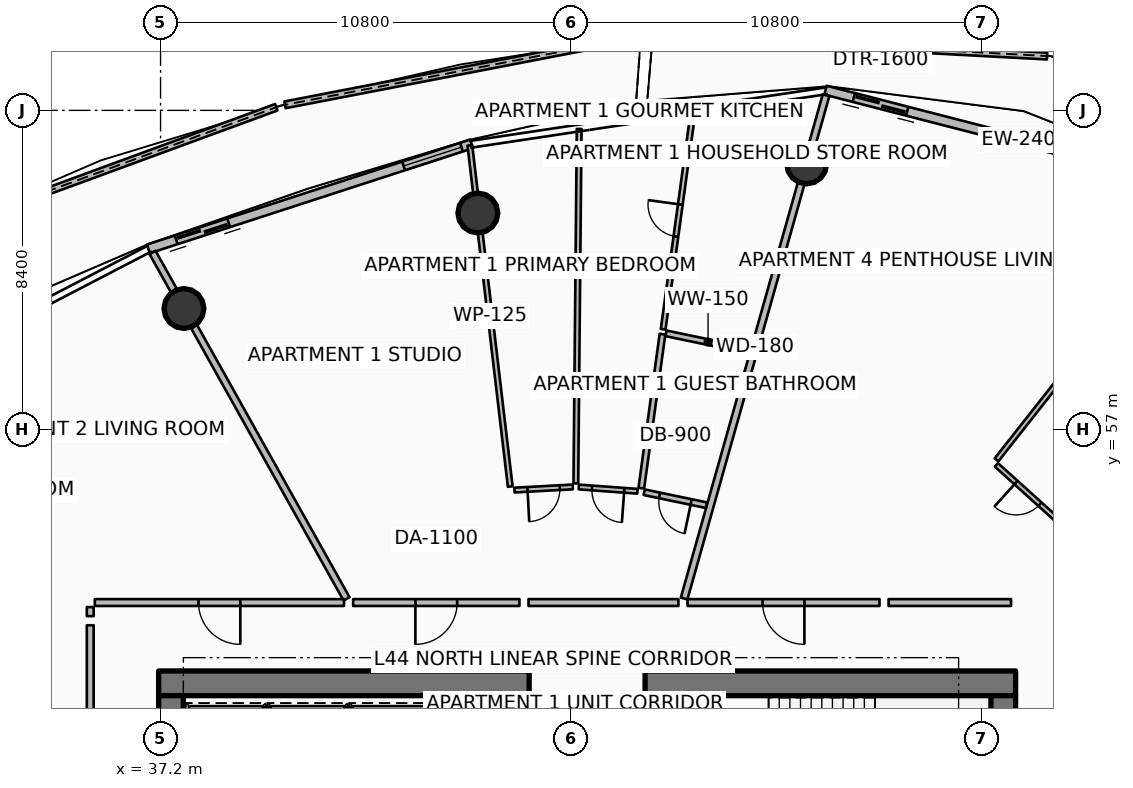
"""IFC4 building model, lengths in metres.
Left out: names, types, materials, properties, quantities, classifications, styles, units other than length and angle.
Written with IfcOpenShell. Run it as: python <this file> out.ifc"""

import sys

from ifc_helpers import new_model, si_unit, direction, frame, frame_2d, origin, origin_2d, place, context, subcontext, project, spatial, polyline, rectangle, circle, outline, extrude, element, fill, save


model = new_model("IFC4")
c1 = context("Model", 3, precision=1e-05, world=origin(), true_north=direction((0.0, 1.0)))
c2 = subcontext(c1, "Body", "Model", "MODEL_VIEW")
j1 = project(units=[si_unit("LENGTHUNIT", "METRE"), si_unit("PLANEANGLEUNIT", "RADIAN")], contexts=[c1])
p1 = place(None, origin())
s1 = spatial("IfcSite", under=j1, at=p1, CompositionType="ELEMENT")
p2 = place(p1, origin())
s2 = spatial("IfcBuilding", under=s1, at=p2, CompositionType="ELEMENT")
p3 = place(p2, frame((0.0, 0.0, 176.55)))
s3 = spatial("IfcBuildingStorey", under=s2, at=p3, CompositionType="ELEMENT", Elevation=176.55)
for number, where, z_axis, x_axis in (
    (1, (37.15, 50.325, 0.0), (0.0, 0.0, 1.0), (1.0, 0.0, 0.0)),
    (2, (49.95, 50.325, 0.0), (0.0, 0.0, 1.0), (1.0, 0.0, 0.0)),
):
    element("IfcWall", number, at=place(p3, frame(where, z_axis=z_axis, x_axis=x_axis)), inside=s3, PredefinedType="SHEAR", context=c2, shape_type="SweptSolid", body=[
        extrude(rectangle(XDim=9.75, YDim=0.65, at=frame_2d((4.875, 0.0))), origin(), (0.0, 0.0, 1.0), 3.75),
    ])
for number, where, z_axis, x_axis in (
    (3, (37.475, 34.0, 0.0), (0.0, 0.0, 1.0), (0.0, 1.0, 0.0)),
    (4, (59.375, 34.0, 0.0), (0.0, 0.0, 1.0), (0.0, 1.0, 0.0)),
):
    element("IfcWall", number, at=place(p3, frame(where, z_axis=z_axis, x_axis=x_axis)), inside=s3, PredefinedType="SHEAR", context=c2, shape_type="SweptSolid", body=[
        extrude(rectangle(XDim=16.0, YDim=0.65, at=frame_2d((8.0, 0.0))), origin(), (0.0, 0.0, 1.0), 3.75),
    ])
p4 = place(p3, frame((51.31, 46.5, 0.0), z_axis=(0.0, 0.0, 1.0), x_axis=(0.0, 1.0, 0.0)))
e5 = element("IfcWall", 5, at=p4, inside=s3, PredefinedType="SHEAR", context=c2, shape_type="SweptSolid", body=[
    extrude(rectangle(XDim=3.5, YDim=0.28, at=frame_2d((1.75, 0.0))), origin(), (0.0, 0.0, 1.0), 3.75),
])
for number, where, z_axis, x_axis in (
    (6, (54.202, 63.992, 0.0), (0.0, 0.0, 1.0), (1.0, 0.0, 0.0)),
    (7, (45.55, 62.7, 0.0), (0.0, 0.0, 1.0), (1.0, 0.0, 0.0)),
    (8, (37.815, 60.186, 0.0), (0.0, 0.0, 1.0), (1.0, 0.0, 0.0)),
):
    element("IfcColumn", number, at=place(p3, frame(where, z_axis=z_axis, x_axis=x_axis)), inside=s3, PredefinedType="COLUMN", context=c2, shape_type="SweptSolid", body=[
        extrude(circle(Radius=0.525, at=origin_2d()), origin(), (0.0, 0.0, 1.0), 3.5),
    ])
p5 = place(p3, frame((60.528, 66.83, 0.0), z_axis=(0.0, 0.0, 1.0), x_axis=(-0.998572477619, 0.053413546421, 0.0)))
e9 = element("IfcWall", 9, at=p5, inside=s3, PredefinedType="PARAPET", context=c2, shape_type="SweptSolid", body=[
    extrude(outline(polyline([(0.0, 0.0), (10.389, 0.0), (10.389, 1.224), (5.195, 1.127), (0.0, 1.148), (0.0, 0.0)])), frame((0.0, 0.09, 0.0), z_axis=(0.0, -1.0, 0.0), x_axis=(1.0, 0.0, 0.0)), (0.0, 0.0, 1.0), 0.18),
])
p6 = place(p3, frame((49.839, 67.351, 0.0), z_axis=(0.0, 0.0, 1.0), x_axis=(-0.981918699124, -0.189303112259, 0.0)))
e10 = element("IfcWall", 10, at=p6, inside=s3, PredefinedType="PARAPET", context=c2, shape_type="SweptSolid", body=[
    extrude(outline(polyline([(0.0, 0.0), (9.537, 0.0), (9.537, 1.632), (4.769, 1.418), (0.0, 1.233), (0.0, 0.0)])), frame((0.0, 0.09, 0.0), z_axis=(0.0, -1.0, 0.0), x_axis=(1.0, 0.0, 0.0)), (0.0, 0.0, 1.0), 0.18),
])
p7 = place(p3, frame((40.244, 65.482, 0.0), z_axis=(0.0, 0.0, 1.0), x_axis=(-0.938669265972, -0.344818806214, 0.0)))
e11 = element("IfcWall", 11, at=p7, inside=s3, PredefinedType="PARAPET", context=c2, shape_type="SweptSolid", body=[
    extrude(outline(polyline([(0.0, 0.0), (9.803, 0.0), (9.802, 1.86), (4.901, 1.798), (0.0, 1.632), (0.0, 0.0)])), frame((0.0, 0.09, 0.0), z_axis=(0.0, -1.0, 0.0), x_axis=(1.0, 0.0, 0.0)), (0.0, 0.0, 1.0), 0.18),
])
p8 = place(p3, frame((64.86, 63.313, 0.0), z_axis=(0.0, 0.0, 1.0), x_axis=(-0.968374028006, 0.249502989727, 0.0)))
e12 = element("IfcWall", 12, at=p8, inside=s3, PredefinedType="SOLIDWALL", context=c2, shape_type="SweptSolid", body=[
    extrude(rectangle(XDim=10.494, YDim=0.24, at=frame_2d((5.247, 0.0))), origin(), (0.0, 0.0, 1.0), 2.45),
])
p9 = place(p8, frame((8.274, 0.0, 0.0)))
e13 = element("IfcOpeningElement", 13, at=p9, cuts=e12, PredefinedType="OPENING", context=c2, shape_type="SweptSolid", body=[
    extrude(rectangle(XDim=1.45, YDim=2.15, at=frame_2d((0.725, 1.075))), frame((0.0, 0.13, 0.0), z_axis=(0.0, -1.0, 0.0), x_axis=(1.0, 0.0, 0.0)), (0.0, 0.0, 1.0), 0.26),
])
p10 = place(p8, frame((0.28, 0.0, 0.65)))
e14 = element("IfcOpeningElement", 14, at=p10, cuts=e12, PredefinedType="OPENING", context=c2, shape_type="SweptSolid", body=[
    extrude(rectangle(XDim=1.6, YDim=1.5, at=frame_2d((0.8, 0.75))), frame((0.0, 0.13, 0.0), z_axis=(0.0, -1.0, 0.0), x_axis=(1.0, 0.0, 0.0)), (0.0, 0.0, 1.0), 0.26),
])
p11 = place(p3, frame((45.384, 64.519, 0.0), z_axis=(0.0, 0.0, 1.0), x_axis=(-0.951058543936, -0.309010753869, 0.0)))
e15 = element("IfcWall", 15, at=p11, inside=s3, PredefinedType="SOLIDWALL", context=c2, shape_type="SweptSolid", body=[
    extrude(rectangle(XDim=8.942, YDim=0.24, at=frame_2d((4.471, 0.0))), origin(), (0.0, 0.0, 1.0), 2.45),
])
p12 = place(p11, frame((6.722, 0.0, 0.0)))
e16 = element("IfcOpeningElement", 16, at=p12, cuts=e15, PredefinedType="OPENING", context=c2, shape_type="SweptSolid", body=[
    extrude(rectangle(XDim=1.45, YDim=2.15, at=frame_2d((0.725, 1.075))), frame((0.0, 0.13, 0.0), z_axis=(0.0, -1.0, 0.0), x_axis=(1.0, 0.0, 0.0)), (0.0, 0.0, 1.0), 0.26),
])
p13 = place(p11, frame((0.28, 0.0, 0.65)))
e17 = element("IfcOpeningElement", 17, at=p13, cuts=e15, PredefinedType="OPENING", context=c2, shape_type="SweptSolid", body=[
    extrude(rectangle(XDim=1.6, YDim=1.5, at=frame_2d((0.8, 0.75))), frame((0.0, 0.13, 0.0), z_axis=(0.0, -1.0, 0.0), x_axis=(1.0, 0.0, 0.0)), (0.0, 0.0, 1.0), 0.26),
])
for number, where, z_axis, x_axis in (
    (18, (39.975, 48.095, 0.0), (0.0, 0.0, 1.0), (0.0, 1.0, 0.0)),
    (19, (42.125, 48.095, 0.0), (0.0, 0.0, 1.0), (0.0, 1.0, 0.0)),
    (20, (44.275, 48.095, 0.0), (0.0, 0.0, 1.0), (0.0, 1.0, 0.0)),
):
    element("IfcWall", number, at=place(p3, frame(where, z_axis=z_axis, x_axis=x_axis)), inside=s3, PredefinedType="PARTITIONING", context=c2, shape_type="SweptSolid", body=[
        extrude(rectangle(XDim=1.61, YDim=0.16, at=frame_2d((0.805, 0.0))), origin(), (0.0, 0.0, 1.0), 3.5),
    ])
p14 = place(p3, frame((46.58, 48.045, 0.0), z_axis=(0.0, 0.0, 1.0), x_axis=(0.0, 1.0, 0.0)))
e21 = element("IfcWall", 21, at=p14, inside=s3, PredefinedType="PARTITIONING", context=c2, shape_type="SweptSolid", body=[
    extrude(rectangle(XDim=1.71, YDim=0.16, at=frame_2d((0.855, 0.0))), origin(), (0.0, 0.0, 1.0), 3.5),
])
p15 = place(p3, frame((50.977, 52.556, 0.0), z_axis=(0.0, 0.0, 1.0), x_axis=(0.271443307373, 0.962454430548, 0.0)))
e22 = element("IfcWall", 22, at=p15, inside=s3, PredefinedType="PARTITIONING", context=c2, shape_type="SweptSolid", body=[
    extrude(rectangle(XDim=13.759, YDim=0.18, at=frame_2d((6.88, 0.0))), origin(), (0.0, 0.0, 1.0), 2.94),
])
p16 = place(p3, frame((42.094, 52.546, 0.0), z_axis=(0.0, 0.0, 1.0), x_axis=(-0.488614041717, 0.872500039104, 0.0)))
e23 = element("IfcWall", 23, at=p16, inside=s3, PredefinedType="PARTITIONING", context=c2, shape_type="SweptSolid", body=[
    extrude(rectangle(XDim=10.448, YDim=0.18, at=frame_2d((5.224, 0.0))), origin(), (0.0, 0.0, 1.0), 2.94),
])
p17 = place(p3, frame((46.643, 52.45, 0.0), z_axis=(0.0, 0.0, 1.0), x_axis=(-1.0, 0.0, 0.0)))
e24 = element("IfcWall", 24, at=p17, inside=s3, PredefinedType="PARTITIONING", context=c2, shape_type="SweptSolid", body=[
    extrude(rectangle(XDim=4.376, YDim=0.18, at=frame_2d((2.188, 0.0))), origin(), (0.0, 0.0, 1.0), 2.94),
])
p18 = place(p17, frame((1.638, 0.0, 0.0)))
e25 = element("IfcOpeningElement", 25, at=p18, cuts=e24, PredefinedType="OPENING", context=c2, shape_type="SweptSolid", body=[
    extrude(rectangle(XDim=1.1, YDim=2.1, at=frame_2d((0.55, 1.05))), frame((0.0, 0.1, 0.0), z_axis=(0.0, -1.0, 0.0), x_axis=(1.0, 0.0, 0.0)), (0.0, 0.0, 1.0), 0.2),
])
p19 = place(p3, frame((50.827, 52.45, 0.0), z_axis=(0.0, 0.0, 1.0), x_axis=(-1.0, 0.0, 0.0)))
e26 = element("IfcWall", 26, at=p19, inside=s3, PredefinedType="PARTITIONING", context=c2, shape_type="SweptSolid", body=[
    extrude(rectangle(XDim=3.944, YDim=0.18, at=frame_2d((1.972, 0.0))), origin(), (0.0, 0.0, 1.0), 2.94),
])
p20 = place(p3, frame((46.402, 55.503, 0.0), z_axis=(0.0, 0.0, 1.0), x_axis=(-0.117526089467, 0.993069795279, 0.0)))
e27 = element("IfcWall", 27, at=p20, inside=s3, PredefinedType="PARTITIONING", context=c2, shape_type="SweptSolid", body=[
    extrude(rectangle(XDim=9.039, YDim=0.125, at=frame_2d((4.519, 0.0))), origin(), (0.0, 0.0, 1.0), 2.94),
])
p21 = place(p3, frame((51.566, 55.011, 0.0), z_axis=(0.0, 0.0, 1.0), x_axis=(-0.978902694913, 0.204326977886, 0.0)))
e28 = element("IfcWall", 28, at=p21, inside=s3, PredefinedType="PARTITIONING", context=c2, shape_type="SweptSolid", body=[
    extrude(rectangle(XDim=1.674, YDim=0.15, at=frame_2d((0.837, 0.0))), origin(), (0.0, 0.0, 1.0), 2.94),
])
p22 = place(p21, frame((0.412, 0.0, 0.0)))
e29 = element("IfcOpeningElement", 29, at=p22, cuts=e28, PredefinedType="OPENING", context=c2, shape_type="SweptSolid", body=[
    extrude(rectangle(XDim=0.85, YDim=2.06, at=frame_2d((0.425, 1.03))), frame((0.0, 0.085, 0.0), z_axis=(0.0, -1.0, 0.0), x_axis=(1.0, 0.0, 0.0)), (0.0, 0.0, 1.0), 0.17),
])
p23 = place(p3, frame((52.711, 59.072, 0.0), z_axis=(0.0, 0.0, 1.0), x_axis=(-0.978902959225, 0.2043257116, 0.0)))
e30 = element("IfcWall", 30, at=p23, inside=s3, PredefinedType="PARTITIONING", context=c2, shape_type="SweptSolid", body=[
    extrude(rectangle(XDim=2.257, YDim=0.15, at=frame_2d((1.128, 0.0))), origin(), (0.0, 0.0, 1.0), 2.94),
])
p24 = place(p3, frame((49.851, 55.46, 0.0), z_axis=(0.0, 0.0, 1.0), x_axis=(0.136221269786, 0.990678437061, 0.0)))
e31 = element("IfcWall", 31, at=p24, inside=s3, PredefinedType="PARTITIONING", context=c2, shape_type="SweptSolid", body=[
    extrude(rectangle(XDim=4.09, YDim=0.15, at=frame_2d((2.045, 0.0))), origin(), (0.0, 0.0, 1.0), 2.94),
])
p25 = place(p3, frame((50.426, 59.641, 0.0), z_axis=(0.0, 0.0, 1.0), x_axis=(0.136229748486, 0.990677271177, 0.0)))
e32 = element("IfcWall", 32, at=p25, inside=s3, PredefinedType="PARTITIONING", context=c2, shape_type="SweptSolid", body=[
    extrude(rectangle(XDim=5.776, YDim=0.125, at=frame_2d((2.888, 0.0))), origin(), (0.0, 0.0, 1.0), 2.94),
])
p26 = place(p25, frame((2.463, 0.0, 0.0)))
e33 = element("IfcOpeningElement", 33, at=p26, cuts=e32, PredefinedType="OPENING", context=c2, shape_type="SweptSolid", body=[
    extrude(rectangle(XDim=0.85, YDim=2.06, at=frame_2d((0.425, 1.03))), frame((0.0, 0.073, 0.0), z_axis=(0.0, -1.0, 0.0), x_axis=(1.0, 0.0, 0.0)), (0.0, 0.0, 1.0), 0.145),
])
p27 = place(p3, frame((48.128, 55.586, 0.0), z_axis=(0.0, 0.0, 1.0), x_axis=(0.009424652092, 0.99995558698, 0.0)))
e34 = element("IfcWall", 34, at=p27, inside=s3, PredefinedType="PARTITIONING", context=c2, shape_type="SweptSolid", body=[
    extrude(rectangle(XDim=9.326, YDim=0.125, at=frame_2d((4.663, 0.0))), origin(), (0.0, 0.0, 1.0), 2.94),
])
p28 = place(p3, frame((49.749, 55.378, 0.0), z_axis=(0.0, 0.0, 1.0), x_axis=(-0.997335405168, 0.072952653133, 0.0)))
e35 = element("IfcWall", 35, at=p28, inside=s3, PredefinedType="PARTITIONING", context=c2, shape_type="SweptSolid", body=[
    extrude(rectangle(XDim=1.546, YDim=0.125, at=frame_2d((0.773, 0.0))), origin(), (0.0, 0.0, 1.0), 2.94),
])
p29 = place(p28, frame((0.348, 0.0, 0.0)))
e36 = element("IfcOpeningElement", 36, at=p29, cuts=e35, PredefinedType="OPENING", context=c2, shape_type="SweptSolid", body=[
    extrude(rectangle(XDim=0.85, YDim=2.06, at=frame_2d((0.425, 1.03))), frame((0.0, 0.073, 0.0), z_axis=(0.0, -1.0, 0.0), x_axis=(1.0, 0.0, 0.0)), (0.0, 0.0, 1.0), 0.145),
])
p30 = place(p3, frame((48.047, 55.492, 0.0), z_axis=(0.0, 0.0, 1.0), x_axis=(-0.998521830203, -0.054352135274, 0.0)))
e37 = element("IfcWall", 37, at=p30, inside=s3, PredefinedType="PARTITIONING", context=c2, shape_type="SweptSolid", body=[
    extrude(rectangle(XDim=1.536, YDim=0.125, at=frame_2d((0.768, 0.0))), origin(), (0.0, 0.0, 1.0), 2.94),
])
p31 = place(p30, frame((0.343, 0.0, 0.0)))
e38 = element("IfcOpeningElement", 38, at=p31, cuts=e37, PredefinedType="OPENING", context=c2, shape_type="SweptSolid", body=[
    extrude(rectangle(XDim=0.85, YDim=2.06, at=frame_2d((0.425, 1.03))), frame((0.0, 0.073, 0.0), z_axis=(0.0, -1.0, 0.0), x_axis=(1.0, 0.0, 0.0)), (0.0, 0.0, 1.0), 0.145),
])
p32 = place(p3, frame((42.028, 52.45, 0.0), z_axis=(0.0, 0.0, 1.0), x_axis=(-1.0, 0.0, 0.0)))
e39 = element("IfcWall", 39, at=p32, inside=s3, PredefinedType="PARTITIONING", context=c2, shape_type="SweptSolid", body=[
    extrude(rectangle(XDim=6.558, YDim=0.18, at=frame_2d((3.279, 0.0))), origin(), (0.0, 0.0, 1.0), 2.94),
])
p33 = place(p32, frame((2.729, 0.0, 0.0)))
e40 = element("IfcOpeningElement", 40, at=p33, cuts=e39, PredefinedType="OPENING", context=c2, shape_type="SweptSolid", body=[
    extrude(rectangle(XDim=1.1, YDim=2.1, at=frame_2d((0.55, 1.05))), frame((0.0, 0.1, 0.0), z_axis=(0.0, -1.0, 0.0), x_axis=(1.0, 0.0, 0.0)), (0.0, 0.0, 1.0), 0.2),
])
p34 = place(p3, frame((35.35, 52.33, 0.0), z_axis=(0.0, 0.0, 1.0), x_axis=(0.0, -1.0, 0.0)))
e41 = element("IfcWall", 41, at=p34, inside=s3, PredefinedType="PARTITIONING", context=c2, shape_type="SweptSolid", body=[
    extrude(rectangle(XDim=0.238, YDim=0.18, at=frame_2d((0.119, 0.0))), origin(), (0.0, 0.0, 1.0), 2.94),
])
p35 = place(p3, frame((35.35, 51.853, 0.0), z_axis=(0.0, 0.0, 1.0), x_axis=(0.0, -1.0, 0.0)))
e42 = element("IfcWall", 42, at=p35, inside=s3, PredefinedType="PARTITIONING", context=c2, shape_type="SweptSolid", body=[
    extrude(rectangle(XDim=6.165, YDim=0.18, at=frame_2d((3.083, 0.0))), origin(), (0.0, 0.0, 1.0), 2.94),
])
p36 = place(p3, frame((56.118, 52.45, 0.0), z_axis=(0.0, 0.0, 1.0), x_axis=(-1.0, 0.0, 0.0)))
e43 = element("IfcWall", 43, at=p36, inside=s3, PredefinedType="PARTITIONING", context=c2, shape_type="SweptSolid", body=[
    extrude(rectangle(XDim=5.051, YDim=0.18, at=frame_2d((2.525, 0.0))), origin(), (0.0, 0.0, 1.0), 2.94),
])
p37 = place(p36, frame((1.975, 0.0, 0.0)))
e44 = element("IfcOpeningElement", 44, at=p37, cuts=e43, PredefinedType="OPENING", context=c2, shape_type="SweptSolid", body=[
    extrude(rectangle(XDim=1.1, YDim=2.1, at=frame_2d((0.55, 1.05))), frame((0.0, 0.1, 0.0), z_axis=(0.0, -1.0, 0.0), x_axis=(1.0, 0.0, 0.0)), (0.0, 0.0, 1.0), 0.2),
])
p38 = place(p3, frame((59.58, 52.45, 0.0), z_axis=(0.0, 0.0, 1.0), x_axis=(-1.0, 0.0, 0.0)))
e45 = element("IfcWall", 45, at=p38, inside=s3, PredefinedType="PARTITIONING", context=c2, shape_type="SweptSolid", body=[
    extrude(rectangle(XDim=3.222, YDim=0.18, at=frame_2d((1.611, 0.0))), origin(), (0.0, 0.0, 1.0), 2.94),
])
p39 = place(p3, frame((59.198, 56.204, 0.0), z_axis=(0.0, 0.0, 1.0), x_axis=(0.619095305497, 0.785315861747, 0.0)))
e46 = element("IfcWall", 46, at=p39, inside=s3, PredefinedType="PARTITIONING", context=c2, shape_type="SweptSolid", body=[
    extrude(rectangle(XDim=9.043, YDim=0.125, at=frame_2d((4.521, 0.0))), origin(), (0.0, 0.0, 1.0), 2.94),
])
p40 = place(p3, frame((60.857, 54.571, 0.0), z_axis=(0.0, 0.0, 1.0), x_axis=(-0.742214573282, 0.670162314076, 0.0)))
e47 = element("IfcWall", 47, at=p40, inside=s3, PredefinedType="PARTITIONING", context=c2, shape_type="SweptSolid", body=[
    extrude(rectangle(XDim=2.24, YDim=0.125, at=frame_2d((1.12, 0.0))), origin(), (0.0, 0.0, 1.0), 2.94),
])
p41 = place(p40, frame((0.695, 0.0, 0.0)))
e48 = element("IfcOpeningElement", 48, at=p41, cuts=e47, PredefinedType="OPENING", context=c2, shape_type="SweptSolid", body=[
    extrude(rectangle(XDim=0.85, YDim=2.06, at=frame_2d((0.425, 1.03))), frame((0.0, 0.073, 0.0), z_axis=(0.0, -1.0, 0.0), x_axis=(1.0, 0.0, 0.0)), (0.0, 0.0, 1.0), 0.145),
])
p42 = place(p9, origin())
e49 = element("IfcDoor", 49, at=p42, inside=s3, OperationType="DOUBLE_DOOR_SLIDING", PredefinedType="DOOR", context=c2, shape_type="SweptSolid", body=[
    extrude(rectangle(XDim=1.45, YDim=2.15, at=frame_2d((0.725, 1.075))), frame((0.0, 0.025, 0.0), z_axis=(0.0, -1.0, 0.0), x_axis=(1.0, 0.0, 0.0)), (0.0, 0.0, 1.0), 0.05),
])
fill(e13, e49)
p43 = place(p12, origin())
e50 = element("IfcDoor", 50, at=p43, inside=s3, OperationType="DOUBLE_DOOR_SLIDING", PredefinedType="DOOR", context=c2, shape_type="SweptSolid", body=[
    extrude(rectangle(XDim=1.45, YDim=2.15, at=frame_2d((0.725, 1.075))), frame((0.0, 0.025, 0.0), z_axis=(0.0, -1.0, 0.0), x_axis=(1.0, 0.0, 0.0)), (0.0, 0.0, 1.0), 0.05),
])
fill(e16, e50)
p44 = place(p13, origin())
e51 = element("IfcWindow", 51, at=p44, inside=s3, PartitioningType="SINGLE_PANEL", PredefinedType="WINDOW", context=c2, shape_type="SweptSolid", body=[
    extrude(rectangle(XDim=1.6, YDim=1.5, at=frame_2d((0.8, 0.75))), frame((0.0, 0.03, 0.0), z_axis=(0.0, -1.0, 0.0), x_axis=(1.0, 0.0, 0.0)), (0.0, 0.0, 1.0), 0.06),
])
fill(e17, e51)
p45 = place(p18, origin())
e52 = element("IfcDoor", 52, at=p45, inside=s3, OperationType="SINGLE_SWING_RIGHT", PredefinedType="DOOR", context=c2, shape_type="SweptSolid", body=[
    extrude(rectangle(XDim=1.1, YDim=2.1, at=frame_2d((0.55, 1.05))), frame((0.0, 0.025, 0.0), z_axis=(0.0, -1.0, 0.0), x_axis=(1.0, 0.0, 0.0)), (0.0, 0.0, 1.0), 0.05),
])
fill(e25, e52)
p46 = place(p22, origin())
e53 = element("IfcDoor", 53, at=p46, inside=s3, OperationType="SINGLE_SWING_LEFT", PredefinedType="DOOR", context=c2, shape_type="SweptSolid", body=[
    extrude(rectangle(XDim=0.85, YDim=2.06, at=frame_2d((0.425, 1.03))), frame((0.0, 0.025, 0.0), z_axis=(0.0, -1.0, 0.0), x_axis=(1.0, 0.0, 0.0)), (0.0, 0.0, 1.0), 0.05),
])
fill(e29, e53)
p47 = place(p26, origin())
e54 = element("IfcDoor", 54, at=p47, inside=s3, OperationType="SINGLE_SWING_RIGHT", PredefinedType="DOOR", context=c2, shape_type="SweptSolid", body=[
    extrude(rectangle(XDim=0.85, YDim=2.06, at=frame_2d((0.425, 1.03))), frame((0.0, 0.025, 0.0), z_axis=(0.0, -1.0, 0.0), x_axis=(1.0, 0.0, 0.0)), (0.0, 0.0, 1.0), 0.05),
])
fill(e33, e54)
p48 = place(p29, origin())
e55 = element("IfcDoor", 55, at=p48, inside=s3, OperationType="SINGLE_SWING_LEFT", PredefinedType="DOOR", context=c2, shape_type="SweptSolid", body=[
    extrude(rectangle(XDim=0.85, YDim=2.06, at=frame_2d((0.425, 1.03))), frame((0.0, 0.025, 0.0), z_axis=(0.0, -1.0, 0.0), x_axis=(1.0, 0.0, 0.0)), (0.0, 0.0, 1.0), 0.05),
])
fill(e36, e55)
p49 = place(p31, origin())
e56 = element("IfcDoor", 56, at=p49, inside=s3, OperationType="SINGLE_SWING_RIGHT", PredefinedType="DOOR", context=c2, shape_type="SweptSolid", body=[
    extrude(rectangle(XDim=0.85, YDim=2.06, at=frame_2d((0.425, 1.03))), frame((0.0, 0.025, 0.0), z_axis=(0.0, -1.0, 0.0), x_axis=(1.0, 0.0, 0.0)), (0.0, 0.0, 1.0), 0.05),
])
fill(e38, e56)
p50 = place(p33, origin())
e57 = element("IfcDoor", 57, at=p50, inside=s3, OperationType="SINGLE_SWING_LEFT", PredefinedType="DOOR", context=c2, shape_type="SweptSolid", body=[
    extrude(rectangle(XDim=1.1, YDim=2.1, at=frame_2d((0.55, 1.05))), frame((0.0, 0.025, 0.0), z_axis=(0.0, -1.0, 0.0), x_axis=(1.0, 0.0, 0.0)), (0.0, 0.0, 1.0), 0.05),
])
fill(e40, e57)
p51 = place(p37, origin())
e58 = element("IfcDoor", 58, at=p51, inside=s3, OperationType="SINGLE_SWING_LEFT", PredefinedType="DOOR", context=c2, shape_type="SweptSolid", body=[
    extrude(rectangle(XDim=1.1, YDim=2.1, at=frame_2d((0.55, 1.05))), frame((0.0, 0.025, 0.0), z_axis=(0.0, -1.0, 0.0), x_axis=(1.0, 0.0, 0.0)), (0.0, 0.0, 1.0), 0.05),
])
fill(e44, e58)
p52 = place(p41, origin())
e59 = element("IfcDoor", 59, at=p52, inside=s3, OperationType="SINGLE_SWING_RIGHT", PredefinedType="DOOR", context=c2, shape_type="SweptSolid", body=[
    extrude(rectangle(XDim=0.85, YDim=2.06, at=frame_2d((0.425, 1.03))), frame((0.0, 0.025, 0.0), z_axis=(0.0, -1.0, 0.0), x_axis=(1.0, 0.0, 0.0)), (0.0, 0.0, 1.0), 0.05),
])
fill(e48, e59)
save(model, sys.argv[1])
